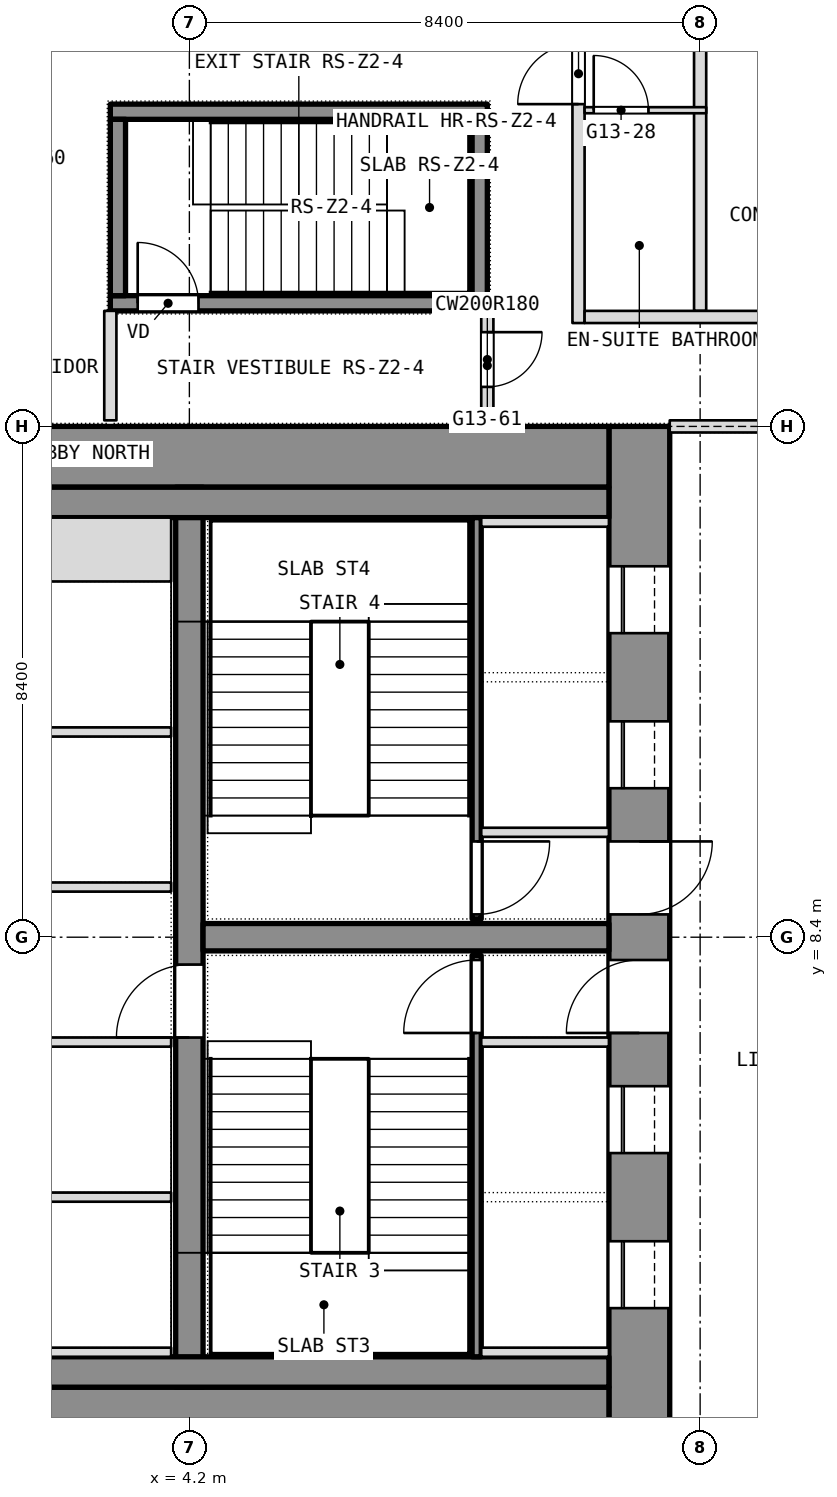
"""IFC4 building model, lengths in metres.
Left out: names, types, materials, properties, quantities, classifications, styles, units other than length and angle.
Written with IfcOpenShell. Run it as: python <this file> out.ifc"""

import sys

from ifc_helpers import new_model, si_unit, direction, frame, frame_2d, origin, place, context, subcontext, project, spatial, rectangle, extrude, element, fill, save


model = new_model("IFC4")
c1 = context("Model", 3, precision=1e-05, world=origin(), true_north=direction((0.0, 1.0)))
c2 = subcontext(c1, "Body", "Model", "MODEL_VIEW")
j1 = project(units=[si_unit("LENGTHUNIT", "METRE"), si_unit("PLANEANGLEUNIT", "RADIAN")], contexts=[c1])
p1 = place(None, origin())
s1 = spatial("IfcSite", under=j1, at=p1, CompositionType="ELEMENT")
p2 = place(p1, origin())
s2 = spatial("IfcBuilding", under=s1, at=p2, CompositionType="ELEMENT")
p3 = place(p2, frame((0.0, 0.0, 155.3)))
s3 = spatial("IfcBuildingStorey", under=s2, at=p3, CompositionType="ELEMENT", Elevation=155.3)
p4 = place(p3, frame((11.6, 0.0, 0.0), z_axis=(0.0, 0.0, 1.0), x_axis=(0.0, 1.0, 0.0)))
e1 = element("IfcWall", 1, at=p4, inside=s3, PredefinedType="SHEAR", context=c2, shape_type="SweptSolid", body=[
    extrude(rectangle(XDim=16.8, YDim=1.0, at=frame_2d((8.4, 0.0))), origin(), (0.0, 0.0, 1.0), 3.6),
])
p5 = place(p4, frame((2.3, 0.0, 0.0)))
e2 = element("IfcOpeningElement", 2, at=p5, cuts=e1, PredefinedType="OPENING", context=c2, shape_type="SweptSolid", body=[
    extrude(rectangle(XDim=1.1, YDim=2.1, at=frame_2d((0.55, 1.05))), frame((0.0, 0.5, 0.0), z_axis=(0.0, -1.0, 0.0), x_axis=(1.0, 0.0, 0.0)), (0.0, 0.0, 1.0), 1.0),
])
p6 = place(p4, frame((4.85, 0.0, 0.0)))
e3 = element("IfcOpeningElement", 3, at=p6, cuts=e1, PredefinedType="OPENING", context=c2, shape_type="SweptSolid", body=[
    extrude(rectangle(XDim=1.1, YDim=2.1, at=frame_2d((0.55, 1.05))), frame((0.0, 0.5, 0.0), z_axis=(0.0, -1.0, 0.0), x_axis=(1.0, 0.0, 0.0)), (0.0, 0.0, 1.0), 1.0),
])
p7 = place(p4, frame((6.825, 0.0, 0.0)))
e4 = element("IfcOpeningElement", 4, at=p7, cuts=e1, PredefinedType="OPENING", context=c2, shape_type="SweptSolid", body=[
    extrude(rectangle(XDim=1.2, YDim=2.1, at=frame_2d((0.6, 1.05))), frame((0.0, 0.5, 0.0), z_axis=(0.0, -1.0, 0.0), x_axis=(1.0, 0.0, 0.0)), (0.0, 0.0, 1.0), 1.0),
])
p8 = place(p4, frame((13.4, 0.0, 0.0)))
e5 = element("IfcOpeningElement", 5, at=p8, cuts=e1, PredefinedType="OPENING", context=c2, shape_type="SweptSolid", body=[
    extrude(rectangle(XDim=1.1, YDim=2.1, at=frame_2d((0.55, 1.05))), frame((0.0, 0.5, 0.0), z_axis=(0.0, -1.0, 0.0), x_axis=(1.0, 0.0, 0.0)), (0.0, 0.0, 1.0), 1.0),
])
p9 = place(p4, frame((10.85, 0.0, 0.0)))
e6 = element("IfcOpeningElement", 6, at=p9, cuts=e1, PredefinedType="OPENING", context=c2, shape_type="SweptSolid", body=[
    extrude(rectangle(XDim=1.1, YDim=2.1, at=frame_2d((0.55, 1.05))), frame((0.0, 0.5, 0.0), z_axis=(0.0, -1.0, 0.0), x_axis=(1.0, 0.0, 0.0)), (0.0, 0.0, 1.0), 1.0),
])
p10 = place(p4, frame((8.775, 0.0, 0.0)))
e7 = element("IfcOpeningElement", 7, at=p10, cuts=e1, PredefinedType="OPENING", context=c2, shape_type="SweptSolid", body=[
    extrude(rectangle(XDim=1.2, YDim=2.1, at=frame_2d((0.6, 1.05))), frame((0.0, 0.5, 0.0), z_axis=(0.0, -1.0, 0.0), x_axis=(1.0, 0.0, 0.0)), (0.0, 0.0, 1.0), 1.0),
])
for number, where, z_axis, x_axis in (
    (8, (-11.1, 0.5, 0.0), (0.0, 0.0, 1.0), (1.0, 0.0, 0.0)),
    (9, (-11.1, 16.3, 0.0), (0.0, 0.0, 1.0), (1.0, 0.0, 0.0)),
):
    element("IfcWall", number, at=place(p3, frame(where, z_axis=z_axis, x_axis=x_axis)), inside=s3, PredefinedType="SHEAR", context=c2, shape_type="SweptSolid", body=[
        extrude(rectangle(XDim=22.2, YDim=1.0, at=frame_2d((11.1, 0.0))), origin(), (0.0, 0.0, 1.0), 3.6),
    ])
p11 = place(p3, frame((4.2, 1.0, 0.0), z_axis=(0.0, 0.0, 1.0), x_axis=(0.0, 1.0, 0.0)))
e10 = element("IfcWall", 10, at=p11, inside=s3, PredefinedType="SHEAR", context=c2, shape_type="SweptSolid", body=[
    extrude(rectangle(XDim=14.8, YDim=0.45, at=frame_2d((7.4, 0.0))), origin(), (0.0, 0.0, 1.0), 3.6),
])
p12 = place(p11, frame((5.75, 0.0, 0.0)))
e11 = element("IfcOpeningElement", 11, at=p12, cuts=e10, PredefinedType="OPENING", context=c2, shape_type="SweptSolid", body=[
    extrude(rectangle(XDim=1.2, YDim=2.1, at=frame_2d((0.6, 1.05))), frame((0.0, 0.225, 0.0), z_axis=(0.0, -1.0, 0.0), x_axis=(1.0, 0.0, 0.0)), (0.0, 0.0, 1.0), 0.45),
])
p13 = place(p3, frame((4.425, 8.4, 0.0), z_axis=(0.0, 0.0, 1.0), x_axis=(1.0, 0.0, 0.0)))
e12 = element("IfcWall", 12, at=p13, inside=s3, PredefinedType="SHEAR", context=c2, shape_type="SweptSolid", body=[
    extrude(rectangle(XDim=6.675, YDim=0.45, at=frame_2d((3.337, 0.0))), origin(), (0.0, 0.0, 1.0), 3.6),
])
p14 = place(p3, frame((12.6, 18.7, 0.0), z_axis=(0.0, 0.0, 1.0), x_axis=(0.0, 1.0, 0.0)))
e13 = element("IfcWall", 13, at=p14, inside=s3, PredefinedType="PARTITIONING", context=c2, shape_type="SweptSolid", body=[
    extrude(rectangle(XDim=9.24, YDim=0.2, at=frame_2d((4.62, 0.0))), origin(), (0.0, 0.0, 1.0), 3.34),
])
p15 = place(p3, frame((10.6, 18.5, 0.0), z_axis=(0.0, 0.0, 1.0), x_axis=(0.0, 1.0, 0.0)))
e14 = element("IfcWall", 14, at=p15, inside=s3, PredefinedType="PARTITIONING", context=c2, shape_type="SweptSolid", body=[
    extrude(rectangle(XDim=5.0, YDim=0.2, at=frame_2d((2.5, 0.0))), origin(), (0.0, 0.0, 1.0), 3.34),
])
p16 = place(p15, frame((3.6, 0.0, 0.0)))
e15 = element("IfcOpeningElement", 15, at=p16, cuts=e14, PredefinedType="OPENING", context=c2, shape_type="SweptSolid", body=[
    extrude(rectangle(XDim=1.0, YDim=2.1, at=frame_2d((0.5, 1.05))), frame((0.0, 0.1, 0.0), z_axis=(0.0, -1.0, 0.0), x_axis=(1.0, 0.0, 0.0)), (0.0, 0.0, 1.0), 0.2),
])
p17 = place(p3, frame((9.1, 16.9, 0.0), z_axis=(0.0, 0.0, 1.0), x_axis=(0.0, 1.0, 0.0)))
e16 = element("IfcWall", 16, at=p17, inside=s3, PredefinedType="PARTITIONING", context=c2, shape_type="SweptSolid", body=[
    extrude(rectangle(XDim=1.8, YDim=0.2, at=frame_2d((0.9, 0.0))), origin(), (0.0, 0.0, 1.0), 3.34),
])
p18 = place(p17, frame((0.55, 0.0, 0.0)))
e17 = element("IfcOpeningElement", 17, at=p18, cuts=e16, PredefinedType="OPENING", context=c2, shape_type="SweptSolid", body=[
    extrude(rectangle(XDim=0.9, YDim=2.1, at=frame_2d((0.45, 1.05))), frame((0.0, 0.1, 0.0), z_axis=(0.0, -1.0, 0.0), x_axis=(1.0, 0.0, 0.0)), (0.0, 0.0, 1.0), 0.2),
])
p19 = place(p3, frame((2.9, 16.9, 0.0), z_axis=(0.0, 0.0, 1.0), x_axis=(0.0, 1.0, 0.0)))
e18 = element("IfcWall", 18, at=p19, inside=s3, PredefinedType="PARTITIONING", context=c2, shape_type="SweptSolid", body=[
    extrude(rectangle(XDim=1.8, YDim=0.2, at=frame_2d((0.9, 0.0))), origin(), (0.0, 0.0, 1.0), 3.34),
])
p20 = place(p3, frame((10.7, 18.6, 0.0), z_axis=(0.0, 0.0, 1.0), x_axis=(1.0, 0.0, 0.0)))
e19 = element("IfcWall", 19, at=p20, inside=s3, PredefinedType="PARTITIONING", context=c2, shape_type="SweptSolid", body=[
    extrude(rectangle(XDim=6.2, YDim=0.2, at=frame_2d((3.1, 0.0))), origin(), (0.0, 0.0, 1.0), 3.34),
])
p21 = place(p3, frame((10.7, 22.0, 0.0), z_axis=(0.0, 0.0, 1.0), x_axis=(1.0, 0.0, 0.0)))
e20 = element("IfcWall", 20, at=p21, inside=s3, PredefinedType="PARTITIONING", context=c2, shape_type="SweptSolid", body=[
    extrude(rectangle(XDim=2.0, YDim=0.1, at=frame_2d((1.0, 0.0))), origin(), (0.0, 0.0, 1.0), 3.34),
])
p22 = place(p21, frame((0.15, 0.0, 0.0)))
e21 = element("IfcOpeningElement", 21, at=p22, cuts=e20, PredefinedType="OPENING", context=c2, shape_type="SweptSolid", body=[
    extrude(rectangle(XDim=0.9, YDim=2.1, at=frame_2d((0.45, 1.05))), frame((0.0, 0.05, 0.0), z_axis=(0.0, -1.0, 0.0), x_axis=(1.0, 0.0, 0.0)), (0.0, 0.0, 1.0), 0.1),
])
for number, where, z_axis, x_axis in (
    (22, (-11.1, 1.25, 0.0), (0.0, 0.0, 1.0), (1.0, 0.0, 0.0)),
    (23, (-11.1, 15.55, 0.0), (0.0, 0.0, 1.0), (1.0, 0.0, 0.0)),
):
    element("IfcWall", number, at=place(p3, frame(where, z_axis=z_axis, x_axis=x_axis)), inside=s3, PredefinedType="PARTITIONING", context=c2, shape_type="SweptSolid", body=[
        extrude(rectangle(XDim=22.2, YDim=0.5, at=frame_2d((11.1, 0.0))), origin(), (0.0, 0.0, 1.0), 3.34),
    ])
p23 = place(p3, frame((8.925, 1.5, 0.0), z_axis=(0.0, 0.0, 1.0), x_axis=(0.0, 1.0, 0.0)))
e24 = element("IfcWall", 24, at=p23, inside=s3, PredefinedType="SHEAR", context=c2, shape_type="SweptSolid", body=[
    extrude(rectangle(XDim=6.6, YDim=0.15, at=frame_2d((3.3, 0.0))), origin(), (0.0, 0.0, 1.0), 3.34),
])
p24 = place(p23, frame((5.325, 0.0, 0.0)))
e25 = element("IfcOpeningElement", 25, at=p24, cuts=e24, PredefinedType="OPENING", context=c2, shape_type="SweptSolid", body=[
    extrude(rectangle(XDim=1.2, YDim=2.1, at=frame_2d((0.6, 1.05))), frame((0.0, 0.075, 0.0), z_axis=(0.0, -1.0, 0.0), x_axis=(1.0, 0.0, 0.0)), (0.0, 0.0, 1.0), 0.15),
])
for number, where, z_axis, x_axis in (
    (26, (9.0, 6.675, 0.0), (0.0, 0.0, 1.0), (1.0, 0.0, 0.0)),
    (27, (9.0, 1.575, 0.0), (0.0, 0.0, 1.0), (1.0, 0.0, 0.0)),
):
    element("IfcWall", number, at=place(p3, frame(where, z_axis=z_axis, x_axis=x_axis)), inside=s3, PredefinedType="SHEAR", context=c2, shape_type="SweptSolid", body=[
        extrude(rectangle(XDim=2.1, YDim=0.15, at=frame_2d((1.05, 0.0))), origin(), (0.0, 0.0, 1.0), 3.6),
    ])
p25 = place(p3, frame((8.925, 8.7, 0.0), z_axis=(0.0, 0.0, 1.0), x_axis=(0.0, 1.0, 0.0)))
e28 = element("IfcWall", 28, at=p25, inside=s3, PredefinedType="SHEAR", context=c2, shape_type="SweptSolid", body=[
    extrude(rectangle(XDim=6.6, YDim=0.15, at=frame_2d((3.3, 0.0))), origin(), (0.0, 0.0, 1.0), 3.34),
])
p26 = place(p25, frame((0.075, 0.0, 0.0)))
e29 = element("IfcOpeningElement", 29, at=p26, cuts=e28, PredefinedType="OPENING", context=c2, shape_type="SweptSolid", body=[
    extrude(rectangle(XDim=1.2, YDim=2.1, at=frame_2d((0.6, 1.05))), frame((0.0, 0.075, 0.0), z_axis=(0.0, -1.0, 0.0), x_axis=(1.0, 0.0, 0.0)), (0.0, 0.0, 1.0), 0.15),
])
for number, where, z_axis, x_axis in (
    (30, (9.0, 10.125, 0.0), (0.0, 0.0, 1.0), (1.0, 0.0, 0.0)),
    (31, (9.0, 15.225, 0.0), (0.0, 0.0, 1.0), (1.0, 0.0, 0.0)),
):
    element("IfcWall", number, at=place(p3, frame(where, z_axis=z_axis, x_axis=x_axis)), inside=s3, PredefinedType="SHEAR", context=c2, shape_type="SweptSolid", body=[
        extrude(rectangle(XDim=2.1, YDim=0.15, at=frame_2d((1.05, 0.0))), origin(), (0.0, 0.0, 1.0), 3.6),
    ])
p27 = place(p3, frame((-3.9, 4.125, 0.0), z_axis=(0.0, 0.0, 1.0), x_axis=(1.0, 0.0, 0.0)))
e32 = element("IfcWall", 32, at=p27, inside=s3, PredefinedType="PARTITIONING", context=c2, shape_type="SweptSolid", body=[
    extrude(rectangle(XDim=7.8, YDim=0.15, at=frame_2d((3.9, 0.0))), origin(), (0.0, 0.0, 1.0), 3.34),
])
p28 = place(p27, frame((3.75, 0.0, 0.0)))
e33 = element("IfcOpeningElement", 33, at=p28, cuts=e32, PredefinedType="OPENING", context=c2, shape_type="SweptSolid", body=[
    extrude(rectangle(XDim=1.2, YDim=2.1, at=frame_2d((0.6, 1.05))), frame((0.0, 0.075, 0.0), z_axis=(0.0, -1.0, 0.0), x_axis=(1.0, 0.0, 0.0)), (0.0, 0.0, 1.0), 0.15),
])
p29 = place(p3, frame((-3.9, 11.775, 0.0), z_axis=(0.0, 0.0, 1.0), x_axis=(1.0, 0.0, 0.0)))
e34 = element("IfcWall", 34, at=p29, inside=s3, PredefinedType="PARTITIONING", context=c2, shape_type="SweptSolid", body=[
    extrude(rectangle(XDim=7.8, YDim=0.15, at=frame_2d((3.9, 0.0))), origin(), (0.0, 0.0, 1.0), 3.34),
])
p30 = place(p29, frame((3.3, 0.0, 0.0)))
e35 = element("IfcOpeningElement", 35, at=p30, cuts=e34, PredefinedType="OPENING", context=c2, shape_type="SweptSolid", body=[
    extrude(rectangle(XDim=1.2, YDim=2.1, at=frame_2d((0.6, 1.05))), frame((0.0, 0.075, 0.0), z_axis=(0.0, -1.0, 0.0), x_axis=(1.0, 0.0, 0.0)), (0.0, 0.0, 1.0), 0.15),
])
p31 = place(p3, frame((1.65, 1.575, 0.0), z_axis=(0.0, 0.0, 1.0), x_axis=(1.0, 0.0, 0.0)))
e36 = element("IfcWall", 36, at=p31, inside=s3, PredefinedType="SHEAR", context=c2, shape_type="SweptSolid", body=[
    extrude(rectangle(XDim=2.25, YDim=0.15, at=frame_2d((1.125, 0.0))), origin(), (0.0, 0.0, 1.0), 3.6),
])
p32 = place(p3, frame((1.65, 14.775, 0.0), z_axis=(0.0, 0.0, 1.0), x_axis=(1.0, 0.0, 0.0)))
e37 = element("IfcWall", 37, at=p32, inside=s3, PredefinedType="SHEAR", context=c2, shape_type="SweptSolid", body=[
    extrude(rectangle(XDim=2.25, YDim=1.05, at=frame_2d((1.125, 0.0))), origin(), (0.0, 0.0, 1.0), 3.6),
])
for number, where, z_axis, x_axis in (
    (38, (1.65, 6.675, 0.0), (0.0, 0.0, 1.0), (1.0, 0.0, 0.0)),
    (39, (1.65, 9.225, 0.0), (0.0, 0.0, 1.0), (1.0, 0.0, 0.0)),
):
    element("IfcWall", number, at=place(p3, frame(where, z_axis=z_axis, x_axis=x_axis)), inside=s3, PredefinedType="SHEAR", context=c2, shape_type="SweptSolid", body=[
        extrude(rectangle(XDim=2.25, YDim=0.15, at=frame_2d((1.125, 0.0))), origin(), (0.0, 0.0, 1.0), 3.6),
    ])
p33 = place(p3, frame((12.1, 16.8, 0.0), z_axis=(0.0, 0.0, 1.0), x_axis=(1.0, 0.0, 0.0)))
e40 = element("IfcWall", 40, at=p33, inside=s3, PredefinedType="PARTITIONING", context=c2, shape_type="SweptSolid", body=[
    extrude(rectangle(XDim=4.6, YDim=0.2, at=frame_2d((2.3, 0.0))), origin(), (0.0, 0.0, 1.0), 2.89),
])
p34 = place(p3, frame((2.9, 18.825, 0.1), z_axis=(0.0, 0.0, 1.0), x_axis=(1.0, 0.0, 0.0)))
e41 = element("IfcWall", 41, at=p34, inside=s3, PredefinedType="SHEAR", context=c2, shape_type="SweptSolid", body=[
    extrude(rectangle(XDim=6.2, YDim=0.25, at=frame_2d((3.1, 0.0))), origin(), (0.0, 0.0, 1.0), 3.6),
])
p35 = place(p34, frame((0.45, 0.0, 0.0)))
e42 = element("IfcOpeningElement", 42, at=p35, cuts=e41, PredefinedType="OPENING", context=c2, shape_type="SweptSolid", body=[
    extrude(rectangle(XDim=1.0, YDim=2.1, at=frame_2d((0.5, 1.05))), frame((0.0, 0.125, 0.0), z_axis=(0.0, -1.0, 0.0), x_axis=(1.0, 0.0, 0.0)), (0.0, 0.0, 1.0), 0.25),
])
p36 = place(p3, frame((2.9, 21.975, 0.1), z_axis=(0.0, 0.0, 1.0), x_axis=(1.0, 0.0, 0.0)))
e43 = element("IfcWall", 43, at=p36, inside=s3, PredefinedType="SHEAR", context=c2, shape_type="SweptSolid", body=[
    extrude(rectangle(XDim=6.2, YDim=0.25, at=frame_2d((3.1, 0.0))), origin(), (0.0, 0.0, 1.0), 3.6),
])
for number, where, z_axis, x_axis in (
    (44, (3.025, 18.95, 0.1), (0.0, 0.0, 1.0), (0.0, 1.0, 0.0)),
    (45, (8.975, 18.95, 0.1), (0.0, 0.0, 1.0), (0.0, 1.0, 0.0)),
):
    element("IfcWall", number, at=place(p3, frame(where, z_axis=z_axis, x_axis=x_axis)), inside=s3, PredefinedType="SHEAR", context=c2, shape_type="SweptSolid", body=[
        extrude(rectangle(XDim=2.9, YDim=0.25, at=frame_2d((1.45, 0.0))), origin(), (0.0, 0.0, 1.0), 3.6),
    ])
p37 = place(p16, origin())
e46 = element("IfcDoor", 46, at=p37, inside=s3, OperationType="SINGLE_SWING_LEFT", PredefinedType="DOOR", context=c2, shape_type="SweptSolid", body=[
    extrude(rectangle(XDim=1.0, YDim=2.1, at=frame_2d((0.5, 1.05))), frame((0.0, 0.025, 0.0), z_axis=(0.0, -1.0, 0.0), x_axis=(1.0, 0.0, 0.0)), (0.0, 0.0, 1.0), 0.05),
])
fill(e15, e46)
p38 = place(p18, origin())
e47 = element("IfcDoor", 47, at=p38, inside=s3, OperationType="SINGLE_SWING_RIGHT", PredefinedType="DOOR", context=c2, shape_type="SweptSolid", body=[
    extrude(rectangle(XDim=0.9, YDim=2.1, at=frame_2d((0.45, 1.05))), frame((0.0, 0.025, 0.0), z_axis=(0.0, -1.0, 0.0), x_axis=(1.0, 0.0, 0.0)), (0.0, 0.0, 1.0), 0.05),
])
fill(e17, e47)
p39 = place(p22, origin())
e48 = element("IfcDoor", 48, at=p39, inside=s3, OperationType="SINGLE_SWING_RIGHT", PredefinedType="DOOR", context=c2, shape_type="SweptSolid", body=[
    extrude(rectangle(XDim=0.9, YDim=2.1, at=frame_2d((0.45, 1.05))), frame((0.0, 0.025, 0.0), z_axis=(0.0, -1.0, 0.0), x_axis=(1.0, 0.0, 0.0)), (0.0, 0.0, 1.0), 0.05),
])
fill(e21, e48)
p40 = place(p35, origin())
e49 = element("IfcDoor", 49, at=p40, inside=s3, OperationType="SINGLE_SWING_LEFT", PredefinedType="DOOR", context=c2, shape_type="SweptSolid", body=[
    extrude(rectangle(XDim=1.0, YDim=2.1, at=frame_2d((0.5, 1.05))), frame((0.0, 0.025, 0.0), z_axis=(0.0, -1.0, 0.0), x_axis=(1.0, 0.0, 0.0)), (0.0, 0.0, 1.0), 0.05),
])
fill(e42, e49)
p41 = place(p5, origin())
e50 = element("IfcDoor", 50, at=p41, inside=s3, OperationType="SLIDING_TO_LEFT", PredefinedType="DOOR", context=c2, shape_type="SweptSolid", body=[
    extrude(rectangle(XDim=1.1, YDim=2.1, at=frame_2d((0.55, 1.05))), frame((0.0, 0.025, 0.0), z_axis=(0.0, -1.0, 0.0), x_axis=(1.0, 0.0, 0.0)), (0.0, 0.0, 1.0), 0.05),
])
fill(e2, e50)
p42 = place(p6, origin())
e51 = element("IfcDoor", 51, at=p42, inside=s3, OperationType="SLIDING_TO_LEFT", PredefinedType="DOOR", context=c2, shape_type="SweptSolid", body=[
    extrude(rectangle(XDim=1.1, YDim=2.1, at=frame_2d((0.55, 1.05))), frame((0.0, 0.025, 0.0), z_axis=(0.0, -1.0, 0.0), x_axis=(1.0, 0.0, 0.0)), (0.0, 0.0, 1.0), 0.05),
])
fill(e3, e51)
p43 = place(p7, origin())
e52 = element("IfcDoor", 52, at=p43, inside=s3, OperationType="SINGLE_SWING_LEFT", PredefinedType="DOOR", context=c2, shape_type="SweptSolid", body=[
    extrude(rectangle(XDim=1.2, YDim=2.1, at=frame_2d((0.6, 1.05))), frame((0.0, 0.025, 0.0), z_axis=(0.0, -1.0, 0.0), x_axis=(1.0, 0.0, 0.0)), (0.0, 0.0, 1.0), 0.05),
])
fill(e4, e52)
p44 = place(p24, origin())
e53 = element("IfcDoor", 53, at=p44, inside=s3, OperationType="SINGLE_SWING_LEFT", PredefinedType="DOOR", context=c2, shape_type="SweptSolid", body=[
    extrude(rectangle(XDim=1.2, YDim=2.1, at=frame_2d((0.6, 1.05))), frame((0.0, 0.025, 0.0), z_axis=(0.0, -1.0, 0.0), x_axis=(1.0, 0.0, 0.0)), (0.0, 0.0, 1.0), 0.05),
])
fill(e25, e53)
p45 = place(p8, origin())
e54 = element("IfcDoor", 54, at=p45, inside=s3, OperationType="SLIDING_TO_LEFT", PredefinedType="DOOR", context=c2, shape_type="SweptSolid", body=[
    extrude(rectangle(XDim=1.1, YDim=2.1, at=frame_2d((0.55, 1.05))), frame((0.0, 0.025, 0.0), z_axis=(0.0, -1.0, 0.0), x_axis=(1.0, 0.0, 0.0)), (0.0, 0.0, 1.0), 0.05),
])
fill(e5, e54)
p46 = place(p9, origin())
e55 = element("IfcDoor", 55, at=p46, inside=s3, OperationType="SLIDING_TO_LEFT", PredefinedType="DOOR", context=c2, shape_type="SweptSolid", body=[
    extrude(rectangle(XDim=1.1, YDim=2.1, at=frame_2d((0.55, 1.05))), frame((0.0, 0.025, 0.0), z_axis=(0.0, -1.0, 0.0), x_axis=(1.0, 0.0, 0.0)), (0.0, 0.0, 1.0), 0.05),
])
fill(e6, e55)
p47 = place(p10, origin())
e56 = element("IfcDoor", 56, at=p47, inside=s3, OperationType="SINGLE_SWING_LEFT", PredefinedType="DOOR", context=c2, shape_type="SweptSolid", body=[
    extrude(rectangle(XDim=1.2, YDim=2.1, at=frame_2d((0.6, 1.05))), frame((0.0, 0.025, 0.0), z_axis=(0.0, -1.0, 0.0), x_axis=(1.0, 0.0, 0.0)), (0.0, 0.0, 1.0), 0.05),
])
fill(e7, e56)
p48 = place(p26, origin())
e57 = element("IfcDoor", 57, at=p48, inside=s3, OperationType="SINGLE_SWING_LEFT", PredefinedType="DOOR", context=c2, shape_type="SweptSolid", body=[
    extrude(rectangle(XDim=1.2, YDim=2.1, at=frame_2d((0.6, 1.05))), frame((0.0, 0.025, 0.0), z_axis=(0.0, -1.0, 0.0), x_axis=(1.0, 0.0, 0.0)), (0.0, 0.0, 1.0), 0.05),
])
fill(e29, e57)
p49 = place(p12, origin())
e58 = element("IfcDoor", 58, at=p49, inside=s3, OperationType="SINGLE_SWING_LEFT", PredefinedType="DOOR", context=c2, shape_type="SweptSolid", body=[
    extrude(rectangle(XDim=1.2, YDim=2.1, at=frame_2d((0.6, 1.05))), frame((0.0, 0.025, 0.0), z_axis=(0.0, -1.0, 0.0), x_axis=(1.0, 0.0, 0.0)), (0.0, 0.0, 1.0), 0.05),
])
fill(e11, e58)
save(model, sys.argv[1])
